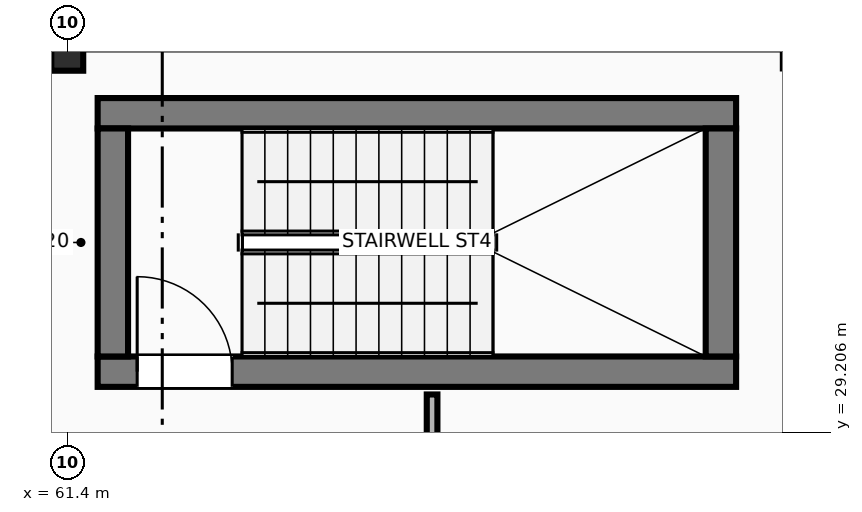
"""IFC4 building model, lengths in metres.
Left out: names, types, materials, properties, quantities, classifications, styles, units other than length and angle.
Written with IfcOpenShell. Run it as: python <this file> out.ifc"""

import sys

from ifc_helpers import new_model, si_unit, direction, frame, frame_2d, origin, origin_2d, place, context, subcontext, project, spatial, rectangle, extrude, element, fill, save


model = new_model("IFC4")
c1 = context("Model", 3, precision=1e-05, world=origin(), true_north=direction((0.0, 1.0)))
c2 = subcontext(c1, "Body", "Model", "MODEL_VIEW")
j1 = project(units=[si_unit("LENGTHUNIT", "METRE"), si_unit("PLANEANGLEUNIT", "RADIAN")], contexts=[c1])
p1 = place(None, origin())
s1 = spatial("IfcSite", under=j1, at=p1, CompositionType="ELEMENT")
p2 = place(p1, origin())
s2 = spatial("IfcBuilding", under=s1, at=p2, CompositionType="ELEMENT")
p3 = place(p2, frame((0.0, 0.0, 9.6)))
s3 = spatial("IfcBuildingStorey", under=s2, at=p3, CompositionType="ELEMENT", Elevation=9.6)
p4 = place(p3, frame((61.4, 34.25, 0.0), z_axis=(0.0, 0.0, 1.0), x_axis=(1.0, 0.0, 0.0)))
e1 = element("IfcColumn", 1, at=p4, inside=s3, PredefinedType="COLUMN", context=c2, shape_type="SweptSolid", body=[
    extrude(rectangle(XDim=0.42, YDim=0.58, at=origin_2d()), origin(), (0.0, 0.0, 1.0), 4.2),
])
p5 = place(p3, frame((61.8, 30.0, 0.0), z_axis=(0.0, 0.0, 1.0), x_axis=(1.0, 0.0, 0.0)))
e2 = element("IfcWall", 2, at=p5, inside=s3, PredefinedType="SHEAR", context=c2, shape_type="SweptSolid", body=[
    extrude(rectangle(XDim=8.4, YDim=0.4, at=frame_2d((4.2, 0.0))), origin(), (0.0, 0.0, 1.0), 3.92),
])
p6 = place(p5, frame((0.52, 0.0, 0.0)))
e3 = element("IfcOpeningElement", 3, at=p6, cuts=e2, PredefinedType="OPENING", context=c2, shape_type="SweptSolid", body=[
    extrude(rectangle(XDim=1.25, YDim=2.2, at=frame_2d((0.625, 1.1))), frame((0.0, 0.21, 0.0), z_axis=(0.0, -1.0, 0.0), x_axis=(1.0, 0.0, 0.0)), (0.0, 0.0, 1.0), 0.42),
])
p7 = place(p3, frame((70.2, 33.4, 0.0), z_axis=(0.0, 0.0, 1.0), x_axis=(-1.0, 0.0, 0.0)))
e4 = element("IfcWall", 4, at=p7, inside=s3, PredefinedType="SHEAR", context=c2, shape_type="SweptSolid", body=[
    extrude(rectangle(XDim=8.4, YDim=0.4, at=frame_2d((4.2, 0.0))), origin(), (0.0, 0.0, 1.0), 3.92),
])
for number, where, z_axis, x_axis in (
    (5, (62.0, 30.2, 0.0), (0.0, 0.0, 1.0), (0.0, 1.0, 0.0)),
    (6, (70.0, 33.2, 0.0), (0.0, 0.0, 1.0), (0.0, -1.0, 0.0)),
):
    element("IfcWall", number, at=place(p3, frame(where, z_axis=z_axis, x_axis=x_axis)), inside=s3, PredefinedType="SHEAR", context=c2, shape_type="SweptSolid", body=[
        extrude(rectangle(XDim=3.0, YDim=0.4, at=frame_2d((1.5, 0.0))), origin(), (0.0, 0.0, 1.0), 3.92),
    ])
p8 = place(p3, frame((66.2, 29.7, 0.0), z_axis=(0.0, 0.0, 1.0), x_axis=(0.0, -1.0, 0.0)))
e7 = element("IfcWall", 7, at=p8, inside=s3, PredefinedType="PARTITIONING", context=c2, shape_type="SweptSolid", body=[
    extrude(rectangle(XDim=4.07, YDim=0.14, at=frame_2d((2.035, 0.0))), origin(), (0.0, 0.0, 1.0), 3.92),
])
p9 = place(p6, origin())
e8 = element("IfcDoor", 8, at=p9, inside=s3, OperationType="SINGLE_SWING_LEFT", PredefinedType="DOOR", context=c2, shape_type="SweptSolid", body=[
    extrude(rectangle(XDim=1.25, YDim=2.2, at=frame_2d((0.625, 1.1))), frame((0.0, 0.025, 0.0), z_axis=(0.0, -1.0, 0.0), x_axis=(1.0, 0.0, 0.0)), (0.0, 0.0, 1.0), 0.05),
])
fill(e3, e8)
save(model, sys.argv[1])
